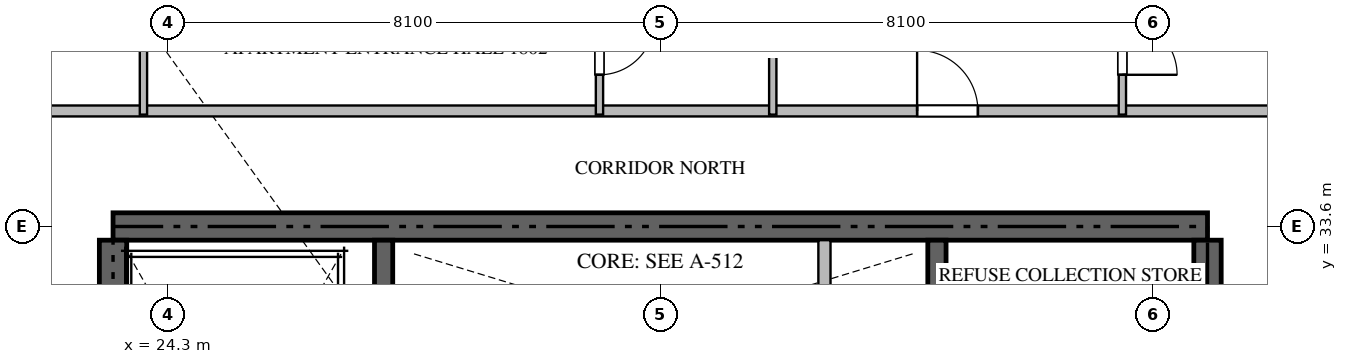
"""IFC4 building model, lengths in metres.
Left out: names, types, materials, properties, quantities, classifications, styles, units other than length and angle.
Written with IfcOpenShell. Run it as: python <this file> out.ifc"""

import sys

from ifc_helpers import new_model, si_unit, direction, frame, frame_2d, origin, place, context, subcontext, project, spatial, rectangle, extrude, source, transform, mapped, element, fill, save


model = new_model("IFC4")
c1 = context("Model", 3, precision=1e-05, world=origin(), true_north=direction((0.0, 1.0)))
c2 = subcontext(c1, "Body", "Model", "MODEL_VIEW")
j1 = project(units=[si_unit("LENGTHUNIT", "METRE"), si_unit("PLANEANGLEUNIT", "RADIAN")], contexts=[c1])
p1 = place(None, origin())
s1 = spatial("IfcSite", under=j1, at=p1, CompositionType="ELEMENT")
p2 = place(p1, origin())
s2 = spatial("IfcBuilding", under=s1, at=p2, CompositionType="ELEMENT")
p3 = place(p2, frame((0.0, 0.0, 75.45)))
s3 = spatial("IfcBuildingStorey", under=s2, at=p3, CompositionType="ELEMENT", Elevation=75.45)
p4 = place(p3, frame((41.4, 33.6, -0.26), z_axis=(0.0, 0.0, 1.0), x_axis=(-1.0, 0.0, 0.0)))
e1 = element("IfcWall", 1, at=p4, inside=s3, PredefinedType="SHEAR", context=c2, shape_type="SweptSolid", body=[
    extrude(rectangle(XDim=18.0, YDim=0.45, at=frame_2d((9.0, 0.0))), origin(), (0.0, 0.0, 1.0), 3.748),
])
p5 = place(p3, frame((23.4, 24.25, -0.26), z_axis=(0.0, 0.0, 1.0), x_axis=(0.0, 1.0, 0.0)))
e2 = element("IfcWall", 2, at=p5, inside=s3, PredefinedType="SHEAR", context=c2, shape_type="SweptSolid", body=[
    extrude(rectangle(XDim=9.125, YDim=0.45, at=frame_2d((4.562, 0.0))), origin(), (0.0, 0.0, 1.0), 3.748),
])
p6 = place(p3, frame((41.4, 27.75, -0.26), z_axis=(0.0, 0.0, 1.0), x_axis=(0.0, 1.0, 0.0)))
e3 = element("IfcWall", 3, at=p6, inside=s3, PredefinedType="SHEAR", context=c2, shape_type="SweptSolid", body=[
    extrude(rectangle(XDim=5.625, YDim=0.45, at=frame_2d((2.812, 0.0))), origin(), (0.0, 0.0, 1.0), 3.748),
])
p7 = place(p3, frame((27.85, 23.55, -0.26), z_axis=(0.0, 0.0, 1.0), x_axis=(0.0, 1.0, 0.0)))
e4 = element("IfcWall", 4, at=p7, inside=s3, PredefinedType="SHEAR", context=c2, shape_type="SweptSolid", body=[
    extrude(rectangle(XDim=9.825, YDim=0.3, at=frame_2d((4.913, 0.0))), origin(), (0.0, 0.0, 1.0), 3.748),
])
p8 = place(p3, frame((36.95, 27.05, -0.26), z_axis=(0.0, 0.0, 1.0), x_axis=(0.0, 1.0, 0.0)))
e5 = element("IfcWall", 5, at=p8, inside=s3, PredefinedType="SHEAR", context=c2, shape_type="SweptSolid", body=[
    extrude(rectangle(XDim=6.325, YDim=0.3, at=frame_2d((3.163, 0.0))), origin(), (0.0, 0.0, 1.0), 3.748),
])
p9 = place(p3, frame((35.1, 30.75, 0.0), z_axis=(0.0, 0.0, 1.0), x_axis=(0.0, 1.0, 0.0)))
e6 = element("IfcWall", 6, at=p9, inside=s3, PredefinedType="STANDARD", context=c2, shape_type="SweptSolid", body=[
    extrude(rectangle(XDim=2.625, YDim=0.2, at=frame_2d((1.312, 0.0))), origin(), (0.0, 0.0, 1.0), 3.49),
])
p10 = place(p3, frame((21.402, 35.5, 0.0), z_axis=(0.0, 0.0, 1.0), x_axis=(1.0, 0.0, 0.0)))
e7 = element("IfcWall", 7, at=p10, inside=s3, PredefinedType="PARTITIONING", context=c2, shape_type="SweptSolid", body=[
    extrude(rectangle(XDim=21.996, YDim=0.18, at=frame_2d((10.998, 0.0))), origin(), (0.0, 0.0, 1.0), 3.49),
])
p11 = place(p10, frame((15.222, 0.0, 0.0)))
e8 = element("IfcOpeningElement", 8, at=p11, cuts=e7, PredefinedType="OPENING", context=c2, shape_type="SweptSolid", body=[
    extrude(rectangle(XDim=1.0, YDim=2.15, at=frame_2d((0.5, 1.075))), frame((0.0, 0.1, 0.0), z_axis=(0.0, -1.0, 0.0), x_axis=(1.0, 0.0, 0.0)), (0.0, 0.0, 1.0), 0.2),
])
p12 = place(p3, frame((34.25, 38.25, 0.0), z_axis=(0.0, 0.0, 1.0), x_axis=(0.0, -1.0, 0.0)))
e9 = element("IfcWall", 9, at=p12, inside=s3, PredefinedType="PARTITIONING", context=c2, shape_type="SweptSolid", body=[
    extrude(rectangle(XDim=2.81, YDim=0.12, at=frame_2d((1.405, 0.0))), origin(), (0.0, 0.0, 1.0), 3.49),
])
p13 = place(p3, frame((31.4, 37.65, 0.0), z_axis=(0.0, 0.0, 1.0), x_axis=(0.0, -1.0, 0.0)))
e10 = element("IfcWall", 10, at=p13, inside=s3, PredefinedType="PARTITIONING", context=c2, shape_type="SweptSolid", body=[
    extrude(rectangle(XDim=2.21, YDim=0.12, at=frame_2d((1.105, 0.0))), origin(), (0.0, 0.0, 1.0), 3.49),
])
p14 = place(p13, frame((0.655, 0.0, 0.0)))
e11 = element("IfcOpeningElement", 11, at=p14, cuts=e10, PredefinedType="OPENING", context=c2, shape_type="SweptSolid", body=[
    extrude(rectangle(XDim=0.9, YDim=2.1, at=frame_2d((0.45, 1.05))), frame((0.0, 0.07, 0.0), z_axis=(0.0, -1.0, 0.0), x_axis=(1.0, 0.0, 0.0)), (0.0, 0.0, 1.0), 0.14),
])
p15 = place(p3, frame((23.9, 37.648, 0.0), z_axis=(0.0, 0.0, 1.0), x_axis=(0.0, -1.0, 0.0)))
e12 = element("IfcWall", 12, at=p15, inside=s3, PredefinedType="PARTITIONING", context=c2, shape_type="SweptSolid", body=[
    extrude(rectangle(XDim=2.208, YDim=0.12, at=frame_2d((1.104, 0.0))), origin(), (0.0, 0.0, 1.0), 3.49),
])
p16 = place(p3, frame((40.0, 37.65, 0.0), z_axis=(0.0, 0.0, 1.0), x_axis=(0.0, -1.0, 0.0)))
e13 = element("IfcWall", 13, at=p16, inside=s3, PredefinedType="PARTITIONING", context=c2, shape_type="SweptSolid", body=[
    extrude(rectangle(XDim=2.21, YDim=0.12, at=frame_2d((1.105, 0.0))), origin(), (0.0, 0.0, 1.0), 3.49),
])
p17 = place(p16, frame((0.655, 0.0, 0.0)))
e14 = element("IfcOpeningElement", 14, at=p17, cuts=e13, PredefinedType="OPENING", context=c2, shape_type="SweptSolid", body=[
    extrude(rectangle(XDim=0.9, YDim=2.1, at=frame_2d((0.45, 1.05))), frame((0.0, 0.07, 0.0), z_axis=(0.0, -1.0, 0.0), x_axis=(1.0, 0.0, 0.0)), (0.0, 0.0, 1.0), 0.14),
])
m1 = source(origin(), c2, "Body", "SweptSolid", [
    extrude(rectangle(XDim=1.0, YDim=2.15, at=frame_2d((0.5, 1.075))), frame((0.0, 0.025, 0.0), z_axis=(0.0, -1.0, 0.0), x_axis=(1.0, 0.0, 0.0)), (0.0, 0.0, 1.0), 0.05),
])
p18 = place(p11, origin())
e15 = element("IfcDoor", 15, at=p18, inside=s3, OperationType="SINGLE_SWING_LEFT", PredefinedType="DOOR", context=c2, shape_type="MappedRepresentation", body=[
    mapped(m1, transform((0.0, 0.0, 0.0), scale=1.0)),
])
fill(e8, e15)
m2 = source(origin(), c2, "Body", "SweptSolid", [
    extrude(rectangle(XDim=0.9, YDim=2.1, at=frame_2d((0.45, 1.05))), frame((0.0, 0.025, 0.0), z_axis=(0.0, -1.0, 0.0), x_axis=(1.0, 0.0, 0.0)), (0.0, 0.0, 1.0), 0.05),
])
p19 = place(p14, origin())
e16 = element("IfcDoor", 16, at=p19, inside=s3, OperationType="SINGLE_SWING_LEFT", PredefinedType="DOOR", context=c2, shape_type="MappedRepresentation", body=[
    mapped(m2, transform((0.0, 0.0, 0.0), scale=1.0)),
])
fill(e11, e16)
p20 = place(p17, origin())
e17 = element("IfcDoor", 17, at=p20, inside=s3, OperationType="SINGLE_SWING_RIGHT", PredefinedType="DOOR", context=c2, shape_type="MappedRepresentation", body=[
    mapped(m2, transform((0.0, 0.0, 0.0), scale=1.0)),
])
fill(e14, e17)
save(model, sys.argv[1])
